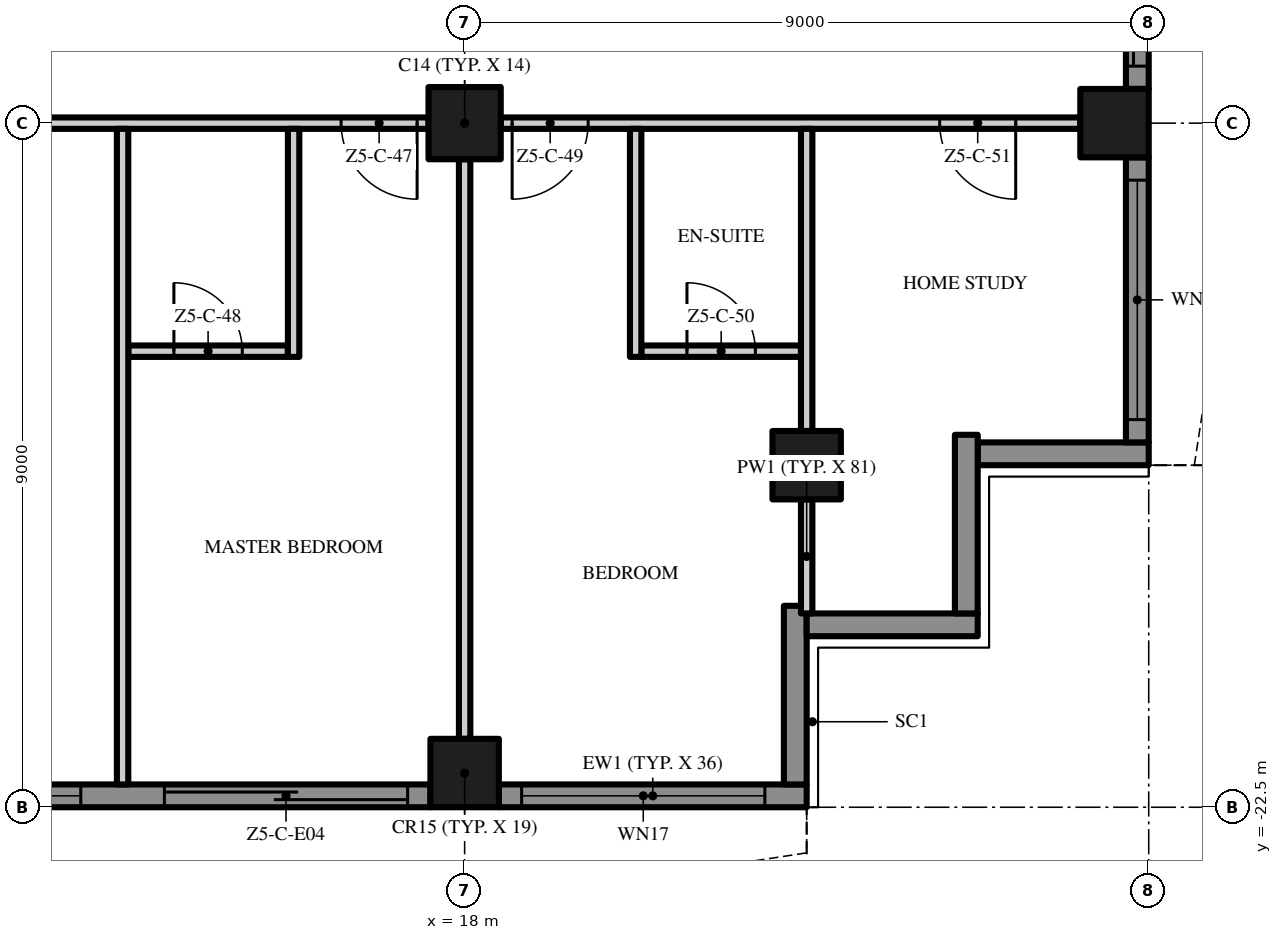
"""IFC4 building model, lengths in metres.
Left out: names, types, materials, properties, quantities, classifications, styles, units other than length and angle.
Written with IfcOpenShell. Run it as: python <this file> out.ifc"""

import sys

from ifc_helpers import new_model, si_unit, direction, frame, frame_2d, origin, origin_2d, place, context, subcontext, project, spatial, polyline, rectangle, outline, extrude, element, fill, save


model = new_model("IFC4")
c1 = context("Model", 3, precision=1e-05, world=origin(), true_north=direction((0.0, 1.0)))
c2 = subcontext(c1, "Body", "Model", "MODEL_VIEW")
j1 = project(units=[si_unit("LENGTHUNIT", "METRE"), si_unit("PLANEANGLEUNIT", "RADIAN")], contexts=[c1])
p1 = place(None, origin())
s1 = spatial("IfcSite", under=j1, at=p1, CompositionType="ELEMENT")
p2 = place(p1, origin())
s2 = spatial("IfcBuilding", under=s1, at=p2, CompositionType="ELEMENT")
p3 = place(p2, frame((0.0, 0.0, 265.4)))
s3 = spatial("IfcBuildingStorey", under=s2, at=p3, CompositionType="ELEMENT", Elevation=265.4)
p4 = place(p3, frame((18.0, -13.5, 0.0), z_axis=(0.0, 0.0, 1.0), x_axis=(1.0, 0.0, 0.0)))
e1 = element("IfcColumn", 1, at=p4, inside=s3, PredefinedType="COLUMN", context=c2, shape_type="SweptSolid", body=[
    extrude(rectangle(XDim=0.95, YDim=0.95, at=origin_2d()), origin(), (0.0, 0.0, 1.0), 3.5),
])
for number, where, z_axis, x_axis in (
    (2, (18.0, -22.05, 0.0), (0.0, 0.0, 1.0), (1.0, 0.0, 0.0)),
    (3, (26.55, -13.5, 0.0), (0.0, 0.0, 1.0), (1.0, 0.0, 0.0)),
    (4, (22.5, -18.0, 0.0), (0.0, 0.0, 1.0), (1.0, 0.0, 0.0)),
):
    element("IfcColumn", number, at=place(p3, frame(where, z_axis=z_axis, x_axis=x_axis)), inside=s3, PredefinedType="COLUMN", context=c2, shape_type="SweptSolid", body=[
        extrude(rectangle(XDim=0.9, YDim=0.9, at=origin_2d()), origin(), (0.0, 0.0, 1.0), 3.5),
    ])
p5 = place(p3, frame((17.55, -22.35, 0.0), z_axis=(0.0, 0.0, 1.0), x_axis=(-1.0, 0.0, 0.0)))
e5 = element("IfcWall", 5, at=p5, inside=s3, PredefinedType="SOLIDWALL", context=c2, shape_type="SweptSolid", body=[
    extrude(rectangle(XDim=8.1, YDim=0.3, at=frame_2d((4.05, 0.0))), origin(), (0.0, 0.0, 1.0), 3.5),
])
p6 = place(p5, frame((4.6, 0.0, 0.45)))
e6 = element("IfcOpeningElement", 6, at=p6, cuts=e5, PredefinedType="OPENING", context=c2, shape_type="SweptSolid", body=[
    extrude(rectangle(XDim=3.2, YDim=2.65, at=frame_2d((1.6, 1.325))), frame((0.0, 0.16, 0.0), z_axis=(0.0, -1.0, 0.0), x_axis=(1.0, 0.0, 0.0)), (0.0, 0.0, 1.0), 0.32),
])
p7 = place(p5, frame((0.3, 0.0, 0.0)))
e7 = element("IfcOpeningElement", 7, at=p7, cuts=e5, PredefinedType="OPENING", context=c2, shape_type="SweptSolid", body=[
    extrude(rectangle(XDim=3.2, YDim=2.4, at=frame_2d((1.6, 1.2))), frame((0.0, 0.16, 0.0), z_axis=(0.0, -1.0, 0.0), x_axis=(1.0, 0.0, 0.0)), (0.0, 0.0, 1.0), 0.32),
])
p8 = place(p3, frame((22.5, -22.35, 0.0), z_axis=(0.0, 0.0, 1.0), x_axis=(-1.0, 0.0, 0.0)))
e8 = element("IfcWall", 8, at=p8, inside=s3, PredefinedType="SOLIDWALL", context=c2, shape_type="SweptSolid", body=[
    extrude(rectangle(XDim=4.05, YDim=0.3, at=frame_2d((2.025, 0.0))), origin(), (0.0, 0.0, 1.0), 3.5),
])
p9 = place(p8, frame((0.55, 0.0, 0.45)))
e9 = element("IfcOpeningElement", 9, at=p9, cuts=e8, PredefinedType="OPENING", context=c2, shape_type="SweptSolid", body=[
    extrude(rectangle(XDim=3.2, YDim=2.65, at=frame_2d((1.6, 1.325))), frame((0.0, 0.16, 0.0), z_axis=(0.0, -1.0, 0.0), x_axis=(1.0, 0.0, 0.0)), (0.0, 0.0, 1.0), 0.32),
])
p10 = place(p3, frame((22.35, -19.85, 0.0), z_axis=(0.0, 0.0, 1.0), x_axis=(0.0, -1.0, 0.0)))
e10 = element("IfcWall", 10, at=p10, inside=s3, PredefinedType="SOLIDWALL", context=c2, shape_type="SweptSolid", body=[
    extrude(rectangle(XDim=2.35, YDim=0.3, at=frame_2d((1.175, 0.0))), origin(), (0.0, 0.0, 1.0), 3.5),
])
p11 = place(p3, frame((24.75, -20.1, 0.0), z_axis=(0.0, 0.0, 1.0), x_axis=(-1.0, 0.0, 0.0)))
e11 = element("IfcWall", 11, at=p11, inside=s3, PredefinedType="SOLIDWALL", context=c2, shape_type="SweptSolid", body=[
    extrude(rectangle(XDim=2.25, YDim=0.3, at=frame_2d((1.125, 0.0))), origin(), (0.0, 0.0, 1.0), 3.5),
])
p12 = place(p3, frame((24.6, -17.6, 0.0), z_axis=(0.0, 0.0, 1.0), x_axis=(0.0, -1.0, 0.0)))
e12 = element("IfcWall", 12, at=p12, inside=s3, PredefinedType="SOLIDWALL", context=c2, shape_type="SweptSolid", body=[
    extrude(rectangle(XDim=2.35, YDim=0.3, at=frame_2d((1.175, 0.0))), origin(), (0.0, 0.0, 1.0), 3.5),
])
p13 = place(p3, frame((27.0, -17.85, 0.0), z_axis=(0.0, 0.0, 1.0), x_axis=(-1.0, 0.0, 0.0)))
e13 = element("IfcWall", 13, at=p13, inside=s3, PredefinedType="SOLIDWALL", context=c2, shape_type="SweptSolid", body=[
    extrude(rectangle(XDim=2.25, YDim=0.3, at=frame_2d((1.125, 0.0))), origin(), (0.0, 0.0, 1.0), 3.5),
])
p14 = place(p3, frame((26.85, -13.95, 0.0), z_axis=(0.0, 0.0, 1.0), x_axis=(0.0, -1.0, 0.0)))
e14 = element("IfcWall", 14, at=p14, inside=s3, PredefinedType="SOLIDWALL", context=c2, shape_type="SweptSolid", body=[
    extrude(rectangle(XDim=3.75, YDim=0.3, at=frame_2d((1.875, 0.0))), origin(), (0.0, 0.0, 1.0), 3.5),
])
p15 = place(p14, frame((0.3, 0.0, 0.45)))
e15 = element("IfcOpeningElement", 15, at=p15, cuts=e14, PredefinedType="OPENING", context=c2, shape_type="SweptSolid", body=[
    extrude(rectangle(XDim=3.15, YDim=2.65, at=frame_2d((1.575, 1.325))), frame((0.0, 0.16, 0.0), z_axis=(0.0, -1.0, 0.0), x_axis=(1.0, 0.0, 0.0)), (0.0, 0.0, 1.0), 0.32),
])
p16 = place(p3, frame((26.85, -4.95, 0.0), z_axis=(0.0, 0.0, 1.0), x_axis=(0.0, -1.0, 0.0)))
e16 = element("IfcWall", 16, at=p16, inside=s3, PredefinedType="SOLIDWALL", context=c2, shape_type="SweptSolid", body=[
    extrude(rectangle(XDim=8.1, YDim=0.3, at=frame_2d((4.05, 0.0))), origin(), (0.0, 0.0, 1.0), 3.5),
])
p17 = place(p16, frame((4.6, 0.0, 0.0)))
e17 = element("IfcOpeningElement", 17, at=p17, cuts=e16, PredefinedType="OPENING", context=c2, shape_type="SweptSolid", body=[
    extrude(rectangle(XDim=3.2, YDim=2.4, at=frame_2d((1.6, 1.2))), frame((0.0, 0.16, 0.0), z_axis=(0.0, -1.0, 0.0), x_axis=(1.0, 0.0, 0.0)), (0.0, 0.0, 1.0), 0.32),
])
p18 = place(p16, frame((0.3, 0.0, 0.45)))
e18 = element("IfcOpeningElement", 18, at=p18, cuts=e16, PredefinedType="OPENING", context=c2, shape_type="SweptSolid", body=[
    extrude(rectangle(XDim=3.2, YDim=2.65, at=frame_2d((1.6, 1.325))), frame((0.0, 0.16, 0.0), z_axis=(0.0, -1.0, 0.0), x_axis=(1.0, 0.0, 0.0)), (0.0, 0.0, 1.0), 0.32),
])
p19 = place(p3, origin())
e19 = element("IfcWall", 19, at=p19, inside=s3, PredefinedType="USERDEFINED", context=c2, shape_type="SweptSolid", body=[
    extrude(outline(polyline([(-22.5, -23.1), (-21.0, -23.329), (-19.5, -23.929), (-18.0, -24.671), (-16.5, -25.271), (-15.0, -25.5), (-13.5, -25.271), (-12.0, -24.671), (-10.5, -23.929), (-9.0, -23.329), (-7.5, -23.1), (-6.0, -23.329), (-4.5, -23.929), (-3.0, -24.671), (-1.5, -25.271), (0.0, -25.5), (1.5, -25.271), (3.0, -24.671), (4.5, -23.929), (6.0, -23.329), (7.5, -23.1), (9.0, -23.329), (10.5, -23.929), (12.0, -24.671), (13.5, -25.271), (15.0, -25.5), (16.5, -25.271), (18.0, -24.671), (19.5, -23.929), (21.0, -23.329), (22.5, -23.1), (22.462, -22.853), (20.934, -23.086), (19.398, -23.701), (17.898, -24.442), (16.434, -25.028), (15.0, -25.247), (13.566, -25.028), (12.102, -24.442), (10.602, -23.701), (9.066, -23.086), (7.5, -22.847), (5.934, -23.086), (4.398, -23.701), (2.898, -24.442), (1.434, -25.028), (0.0, -25.247), (-1.434, -25.028), (-2.898, -24.442), (-4.398, -23.701), (-5.934, -23.086), (-7.5, -22.847), (-9.066, -23.086), (-10.602, -23.701), (-12.102, -24.442), (-13.566, -25.028), (-15.0, -25.247), (-16.434, -25.028), (-17.898, -24.442), (-19.398, -23.701), (-20.934, -23.086), (-22.462, -22.853), (-22.5, -23.1)])), origin(), (0.0, 0.0, 1.0), 0.9),
])
p20 = place(p3, origin())
e20 = element("IfcWall", 20, at=p20, inside=s3, PredefinedType="USERDEFINED", context=c2, shape_type="SweptSolid", body=[
    extrude(outline(polyline([(27.6, -18.0), (27.829, -16.5), (28.429, -15.0), (29.171, -13.5), (29.771, -12.0), (30.0, -10.5), (29.771, -9.0), (29.171, -7.5), (28.429, -6.0), (27.829, -4.5), (27.6, -3.0), (27.829, -1.5), (28.429, 0.0), (29.171, 1.5), (29.771, 3.0), (30.0, 4.5), (29.771, 6.0), (29.171, 7.5), (28.429, 9.0), (27.829, 10.5), (27.6, 12.0), (27.829, 13.5), (28.429, 15.0), (29.171, 16.5), (29.771, 18.0), (29.539, 18.093), (28.942, 16.602), (28.201, 15.102), (27.586, 13.566), (27.347, 12.0), (27.586, 10.434), (28.201, 8.898), (28.942, 7.398), (29.528, 5.934), (29.747, 4.5), (29.528, 3.066), (28.942, 1.602), (28.201, 0.102), (27.586, -1.434), (27.347, -3.0), (27.586, -4.566), (28.201, -6.102), (28.942, -7.602), (29.528, -9.066), (29.747, -10.5), (29.528, -11.934), (28.942, -13.398), (28.201, -14.898), (27.586, -16.434), (27.353, -17.962), (27.6, -18.0)])), origin(), (0.0, 0.0, 1.0), 0.9),
])
p21 = place(p3, frame((13.575, -16.5, 0.0), z_axis=(0.0, 0.0, 1.0), x_axis=(1.0, 0.0, 0.0)))
e21 = element("IfcWall", 21, at=p21, inside=s3, PredefinedType="PARTITIONING", context=c2, shape_type="SweptSolid", body=[
    extrude(rectangle(XDim=2.1, YDim=0.15, at=frame_2d((1.05, 0.0))), origin(), (0.0, 0.0, 1.0), 3.5),
])
p22 = place(p21, frame((0.6, 0.0, 0.0)))
e22 = element("IfcOpeningElement", 22, at=p22, cuts=e21, PredefinedType="OPENING", context=c2, shape_type="SweptSolid", body=[
    extrude(rectangle(XDim=0.9, YDim=2.1, at=frame_2d((0.45, 1.05))), frame((0.0, 0.085, 0.0), z_axis=(0.0, -1.0, 0.0), x_axis=(1.0, 0.0, 0.0)), (0.0, 0.0, 1.0), 0.17),
])
p23 = place(p3, frame((20.325, -16.5, 0.0), z_axis=(0.0, 0.0, 1.0), x_axis=(1.0, 0.0, 0.0)))
e23 = element("IfcWall", 23, at=p23, inside=s3, PredefinedType="PARTITIONING", context=c2, shape_type="SweptSolid", body=[
    extrude(rectangle(XDim=2.1, YDim=0.15, at=frame_2d((1.05, 0.0))), origin(), (0.0, 0.0, 1.0), 3.5),
])
p24 = place(p23, frame((0.6, 0.0, 0.0)))
e24 = element("IfcOpeningElement", 24, at=p24, cuts=e23, PredefinedType="OPENING", context=c2, shape_type="SweptSolid", body=[
    extrude(rectangle(XDim=0.9, YDim=2.1, at=frame_2d((0.45, 1.05))), frame((0.0, 0.085, 0.0), z_axis=(0.0, -1.0, 0.0), x_axis=(1.0, 0.0, 0.0)), (0.0, 0.0, 1.0), 0.17),
])
p25 = place(p3, frame((17.525, -13.5, 0.0), z_axis=(0.0, 0.0, 1.0), x_axis=(-1.0, 0.0, 0.0)))
e25 = element("IfcWall", 25, at=p25, inside=s3, PredefinedType="PARTITIONING", context=c2, shape_type="SweptSolid", body=[
    extrude(rectangle(XDim=8.05, YDim=0.15, at=frame_2d((4.025, 0.0))), origin(), (0.0, 0.0, 1.0), 3.5),
])
p26 = place(p25, frame((6.1, 0.0, 0.0)))
e26 = element("IfcOpeningElement", 26, at=p26, cuts=e25, PredefinedType="OPENING", context=c2, shape_type="SweptSolid", body=[
    extrude(rectangle(XDim=1.8, YDim=2.4, at=frame_2d((0.9, 1.2))), frame((0.0, 0.085, 0.0), z_axis=(0.0, -1.0, 0.0), x_axis=(1.0, 0.0, 0.0)), (0.0, 0.0, 1.0), 0.17),
])
p27 = place(p25, frame((0.15, 0.0, 0.0)))
e27 = element("IfcOpeningElement", 27, at=p27, cuts=e25, PredefinedType="OPENING", context=c2, shape_type="SweptSolid", body=[
    extrude(rectangle(XDim=1.0, YDim=2.4, at=frame_2d((0.5, 1.2))), frame((0.0, 0.085, 0.0), z_axis=(0.0, -1.0, 0.0), x_axis=(1.0, 0.0, 0.0)), (0.0, 0.0, 1.0), 0.17),
])
p28 = place(p3, frame((26.1, -13.5, 0.0), z_axis=(0.0, 0.0, 1.0), x_axis=(-1.0, 0.0, 0.0)))
e28 = element("IfcWall", 28, at=p28, inside=s3, PredefinedType="PARTITIONING", context=c2, shape_type="SweptSolid", body=[
    extrude(rectangle(XDim=7.625, YDim=0.15, at=frame_2d((3.812, 0.0))), origin(), (0.0, 0.0, 1.0), 3.5),
])
p29 = place(p28, frame((6.475, 0.0, 0.0)))
e29 = element("IfcOpeningElement", 29, at=p29, cuts=e28, PredefinedType="OPENING", context=c2, shape_type="SweptSolid", body=[
    extrude(rectangle(XDim=1.0, YDim=2.4, at=frame_2d((0.5, 1.2))), frame((0.0, 0.085, 0.0), z_axis=(0.0, -1.0, 0.0), x_axis=(1.0, 0.0, 0.0)), (0.0, 0.0, 1.0), 0.17),
])
p30 = place(p28, frame((0.85, 0.0, 0.0)))
e30 = element("IfcOpeningElement", 30, at=p30, cuts=e28, PredefinedType="OPENING", context=c2, shape_type="SweptSolid", body=[
    extrude(rectangle(XDim=1.0, YDim=2.4, at=frame_2d((0.5, 1.2))), frame((0.0, 0.085, 0.0), z_axis=(0.0, -1.0, 0.0), x_axis=(1.0, 0.0, 0.0)), (0.0, 0.0, 1.0), 0.17),
])
p31 = place(p3, frame((13.5, -22.2, 0.0), z_axis=(0.0, 0.0, 1.0), x_axis=(0.0, 1.0, 0.0)))
e31 = element("IfcWall", 31, at=p31, inside=s3, PredefinedType="PARTITIONING", context=c2, shape_type="SweptSolid", body=[
    extrude(rectangle(XDim=8.625, YDim=0.15, at=frame_2d((4.312, 0.0))), origin(), (0.0, 0.0, 1.0), 3.5),
])
p32 = place(p3, frame((15.75, -16.575, 0.0), z_axis=(0.0, 0.0, 1.0), x_axis=(0.0, 1.0, 0.0)))
e32 = element("IfcWall", 32, at=p32, inside=s3, PredefinedType="PARTITIONING", context=c2, shape_type="SweptSolid", body=[
    extrude(rectangle(XDim=3.0, YDim=0.15, at=frame_2d((1.5, 0.0))), origin(), (0.0, 0.0, 1.0), 3.5),
])
p33 = place(p3, frame((18.0, -21.6, 0.0), z_axis=(0.0, 0.0, 1.0), x_axis=(0.0, 1.0, 0.0)))
e33 = element("IfcWall", 33, at=p33, inside=s3, PredefinedType="PARTITIONING", context=c2, shape_type="SweptSolid", body=[
    extrude(rectangle(XDim=7.625, YDim=0.15, at=frame_2d((3.812, 0.0))), origin(), (0.0, 0.0, 1.0), 3.5),
])
p34 = place(p3, frame((20.25, -16.575, 0.0), z_axis=(0.0, 0.0, 1.0), x_axis=(0.0, 1.0, 0.0)))
e34 = element("IfcWall", 34, at=p34, inside=s3, PredefinedType="PARTITIONING", context=c2, shape_type="SweptSolid", body=[
    extrude(rectangle(XDim=3.0, YDim=0.15, at=frame_2d((1.5, 0.0))), origin(), (0.0, 0.0, 1.0), 3.5),
])
p35 = place(p3, frame((22.5, -19.95, 0.0), z_axis=(0.0, 0.0, 1.0), x_axis=(0.0, 1.0, 0.0)))
e35 = element("IfcWall", 35, at=p35, inside=s3, PredefinedType="PARTITIONING", context=c2, shape_type="SweptSolid", body=[
    extrude(rectangle(XDim=1.5, YDim=0.15, at=frame_2d((0.75, 0.0))), origin(), (0.0, 0.0, 1.0), 3.5),
])
p36 = place(p3, frame((22.5, -17.55, 0.0), z_axis=(0.0, 0.0, 1.0), x_axis=(0.0, 1.0, 0.0)))
e36 = element("IfcWall", 36, at=p36, inside=s3, PredefinedType="PARTITIONING", context=c2, shape_type="SweptSolid", body=[
    extrude(rectangle(XDim=3.975, YDim=0.15, at=frame_2d((1.988, 0.0))), origin(), (0.0, 0.0, 1.0), 3.5),
])
p37 = place(p6, origin())
e37 = element("IfcWindow", 37, at=p37, inside=s3, PartitioningType="SINGLE_PANEL", PredefinedType="WINDOW", context=c2, shape_type="SweptSolid", body=[
    extrude(rectangle(XDim=3.2, YDim=2.65, at=frame_2d((1.6, 1.325))), frame((0.0, 0.03, 0.0), z_axis=(0.0, -1.0, 0.0), x_axis=(1.0, 0.0, 0.0)), (0.0, 0.0, 1.0), 0.06),
])
fill(e6, e37)
p38 = place(p7, origin())
e38 = element("IfcDoor", 38, at=p38, inside=s3, OperationType="SINGLE_SWING_LEFT", PredefinedType="DOOR", context=c2, shape_type="SweptSolid", body=[
    extrude(rectangle(XDim=3.2, YDim=2.4, at=frame_2d((1.6, 1.2))), frame((0.0, 0.025, 0.0), z_axis=(0.0, -1.0, 0.0), x_axis=(1.0, 0.0, 0.0)), (0.0, 0.0, 1.0), 0.05),
])
fill(e7, e38)
p39 = place(p9, origin())
e39 = element("IfcWindow", 39, at=p39, inside=s3, PartitioningType="SINGLE_PANEL", PredefinedType="WINDOW", context=c2, shape_type="SweptSolid", body=[
    extrude(rectangle(XDim=3.2, YDim=2.65, at=frame_2d((1.6, 1.325))), frame((0.0, 0.03, 0.0), z_axis=(0.0, -1.0, 0.0), x_axis=(1.0, 0.0, 0.0)), (0.0, 0.0, 1.0), 0.06),
])
fill(e9, e39)
p40 = place(p15, origin())
e40 = element("IfcWindow", 40, at=p40, inside=s3, PartitioningType="SINGLE_PANEL", PredefinedType="WINDOW", context=c2, shape_type="SweptSolid", body=[
    extrude(rectangle(XDim=3.15, YDim=2.65, at=frame_2d((1.575, 1.325))), frame((0.0, 0.03, 0.0), z_axis=(0.0, -1.0, 0.0), x_axis=(1.0, 0.0, 0.0)), (0.0, 0.0, 1.0), 0.06),
])
fill(e15, e40)
p41 = place(p17, origin())
e41 = element("IfcDoor", 41, at=p41, inside=s3, OperationType="SINGLE_SWING_LEFT", PredefinedType="DOOR", context=c2, shape_type="SweptSolid", body=[
    extrude(rectangle(XDim=3.2, YDim=2.4, at=frame_2d((1.6, 1.2))), frame((0.0, 0.025, 0.0), z_axis=(0.0, -1.0, 0.0), x_axis=(1.0, 0.0, 0.0)), (0.0, 0.0, 1.0), 0.05),
])
fill(e17, e41)
p42 = place(p27, origin())
e42 = element("IfcDoor", 42, at=p42, inside=s3, OperationType="SINGLE_SWING_LEFT", PredefinedType="DOOR", context=c2, shape_type="SweptSolid", body=[
    extrude(rectangle(XDim=1.0, YDim=2.4, at=frame_2d((0.5, 1.2))), frame((0.0, 0.025, 0.0), z_axis=(0.0, -1.0, 0.0), x_axis=(1.0, 0.0, 0.0)), (0.0, 0.0, 1.0), 0.05),
])
fill(e27, e42)
p43 = place(p22, origin())
e43 = element("IfcDoor", 43, at=p43, inside=s3, OperationType="SINGLE_SWING_LEFT", PredefinedType="DOOR", context=c2, shape_type="SweptSolid", body=[
    extrude(rectangle(XDim=0.9, YDim=2.1, at=frame_2d((0.45, 1.05))), frame((0.0, 0.025, 0.0), z_axis=(0.0, -1.0, 0.0), x_axis=(1.0, 0.0, 0.0)), (0.0, 0.0, 1.0), 0.05),
])
fill(e22, e43)
p44 = place(p29, origin())
e44 = element("IfcDoor", 44, at=p44, inside=s3, OperationType="SINGLE_SWING_RIGHT", PredefinedType="DOOR", context=c2, shape_type="SweptSolid", body=[
    extrude(rectangle(XDim=1.0, YDim=2.4, at=frame_2d((0.5, 1.2))), frame((0.0, 0.025, 0.0), z_axis=(0.0, -1.0, 0.0), x_axis=(1.0, 0.0, 0.0)), (0.0, 0.0, 1.0), 0.05),
])
fill(e29, e44)
p45 = place(p24, origin())
e45 = element("IfcDoor", 45, at=p45, inside=s3, OperationType="SINGLE_SWING_LEFT", PredefinedType="DOOR", context=c2, shape_type="SweptSolid", body=[
    extrude(rectangle(XDim=0.9, YDim=2.1, at=frame_2d((0.45, 1.05))), frame((0.0, 0.025, 0.0), z_axis=(0.0, -1.0, 0.0), x_axis=(1.0, 0.0, 0.0)), (0.0, 0.0, 1.0), 0.05),
])
fill(e24, e45)
p46 = place(p30, origin())
e46 = element("IfcDoor", 46, at=p46, inside=s3, OperationType="SINGLE_SWING_LEFT", PredefinedType="DOOR", context=c2, shape_type="SweptSolid", body=[
    extrude(rectangle(XDim=1.0, YDim=2.4, at=frame_2d((0.5, 1.2))), frame((0.0, 0.025, 0.0), z_axis=(0.0, -1.0, 0.0), x_axis=(1.0, 0.0, 0.0)), (0.0, 0.0, 1.0), 0.05),
])
fill(e30, e46)
save(model, sys.argv[1])
